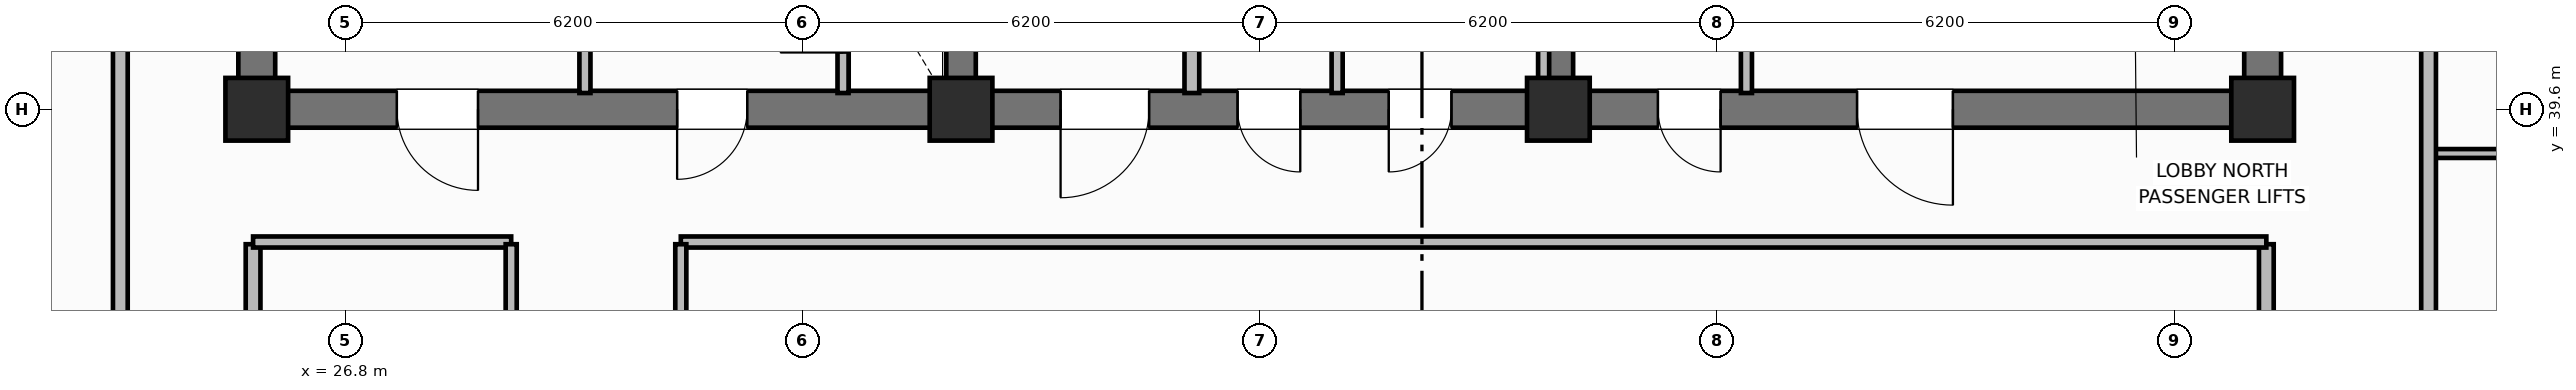
"""IFC4 building model, lengths in metres.
Left out: names, types, materials, properties, quantities, classifications, styles, units other than length and angle.
Written with IfcOpenShell. Run it as: python <this file> out.ifc"""

import sys

from ifc_helpers import new_model, si_unit, direction, frame, frame_2d, origin, origin_2d, place, context, subcontext, project, spatial, rectangle, extrude, element, fill, save


model = new_model("IFC4")
c1 = context("Model", 3, precision=1e-05, world=origin(), true_north=direction((0.0, 1.0)))
c2 = subcontext(c1, "Body", "Model", "MODEL_VIEW")
j1 = project(units=[si_unit("LENGTHUNIT", "METRE"), si_unit("PLANEANGLEUNIT", "RADIAN")], contexts=[c1])
p1 = place(None, origin())
s1 = spatial("IfcSite", under=j1, at=p1, CompositionType="ELEMENT")
p2 = place(p1, origin())
s2 = spatial("IfcBuilding", under=s1, at=p2, CompositionType="ELEMENT")
p3 = place(p2, frame((0.0, 0.0, 203.1)))
s3 = spatial("IfcBuildingStorey", under=s2, at=p3, CompositionType="ELEMENT", Elevation=203.1)
for number, where, z_axis, x_axis in (
    (1, (25.6, 39.85, 0.0), (0.0, 0.0, 1.0), (0.0, 1.0, 0.0)),
    (2, (52.8, 39.85, 0.0), (0.0, 0.0, 1.0), (0.0, 1.0, 0.0)),
):
    element("IfcWall", number, at=place(p3, frame(where, z_axis=z_axis, x_axis=x_axis)), inside=s3, PredefinedType="SHEAR", context=c2, shape_type="SweptSolid", body=[
        extrude(rectangle(XDim=5.7, YDim=0.5, at=frame_2d((2.85, 0.0))), origin(), (0.0, 0.0, 1.0), 4.2),
    ])
p4 = place(p3, frame((52.8, 39.6, 0.0), z_axis=(0.0, 0.0, 1.0), x_axis=(-1.0, 0.0, 0.0)))
e3 = element("IfcWall", 3, at=p4, inside=s3, PredefinedType="SHEAR", context=c2, shape_type="SweptSolid", body=[
    extrude(rectangle(XDim=27.2, YDim=0.5, at=frame_2d((13.6, 0.0))), origin(), (0.0, 0.0, 1.0), 4.2),
])
p5 = place(p4, frame((24.2, 0.0, 0.0)))
e4 = element("IfcOpeningElement", 4, at=p5, cuts=e3, PredefinedType="OPENING", context=c2, shape_type="SweptSolid", body=[
    extrude(rectangle(XDim=1.1, YDim=2.15, at=frame_2d((0.55, 1.075))), frame((0.0, 0.26, 0.0), z_axis=(0.0, -1.0, 0.0), x_axis=(1.0, 0.0, 0.0)), (0.0, 0.0, 1.0), 0.52),
])
p6 = place(p4, frame((20.55, 0.0, 0.0)))
e5 = element("IfcOpeningElement", 5, at=p6, cuts=e3, PredefinedType="OPENING", context=c2, shape_type="SweptSolid", body=[
    extrude(rectangle(XDim=0.95, YDim=2.1, at=frame_2d((0.475, 1.05))), frame((0.0, 0.26, 0.0), z_axis=(0.0, -1.0, 0.0), x_axis=(1.0, 0.0, 0.0)), (0.0, 0.0, 1.0), 0.52),
])
p7 = place(p4, frame((15.1, 0.0, 0.0)))
e6 = element("IfcOpeningElement", 6, at=p7, cuts=e3, PredefinedType="OPENING", context=c2, shape_type="SweptSolid", body=[
    extrude(rectangle(XDim=1.2, YDim=2.15, at=frame_2d((0.6, 1.075))), frame((0.0, 0.26, 0.0), z_axis=(0.0, -1.0, 0.0), x_axis=(1.0, 0.0, 0.0)), (0.0, 0.0, 1.0), 0.52),
])
p8 = place(p4, frame((13.05, 0.0, 0.0)))
e7 = element("IfcOpeningElement", 7, at=p8, cuts=e3, PredefinedType="OPENING", context=c2, shape_type="SweptSolid", body=[
    extrude(rectangle(XDim=0.85, YDim=2.1, at=frame_2d((0.425, 1.05))), frame((0.0, 0.26, 0.0), z_axis=(0.0, -1.0, 0.0), x_axis=(1.0, 0.0, 0.0)), (0.0, 0.0, 1.0), 0.52),
])
p9 = place(p4, frame((11.0, 0.0, 0.0)))
e8 = element("IfcOpeningElement", 8, at=p9, cuts=e3, PredefinedType="OPENING", context=c2, shape_type="SweptSolid", body=[
    extrude(rectangle(XDim=0.85, YDim=2.1, at=frame_2d((0.425, 1.05))), frame((0.0, 0.26, 0.0), z_axis=(0.0, -1.0, 0.0), x_axis=(1.0, 0.0, 0.0)), (0.0, 0.0, 1.0), 0.52),
])
p10 = place(p4, frame((7.35, 0.0, 0.0)))
e9 = element("IfcOpeningElement", 9, at=p10, cuts=e3, PredefinedType="OPENING", context=c2, shape_type="SweptSolid", body=[
    extrude(rectangle(XDim=0.85, YDim=2.1, at=frame_2d((0.425, 1.05))), frame((0.0, 0.26, 0.0), z_axis=(0.0, -1.0, 0.0), x_axis=(1.0, 0.0, 0.0)), (0.0, 0.0, 1.0), 0.52),
])
p11 = place(p4, frame((4.2, 0.0, 0.0)))
e10 = element("IfcOpeningElement", 10, at=p11, cuts=e3, PredefinedType="OPENING", context=c2, shape_type="SweptSolid", body=[
    extrude(rectangle(XDim=1.3, YDim=2.2, at=frame_2d((0.65, 1.1))), frame((0.0, 0.26, 0.0), z_axis=(0.0, -1.0, 0.0), x_axis=(1.0, 0.0, 0.0)), (0.0, 0.0, 1.0), 0.52),
])
for number, where, z_axis, x_axis in (
    (11, (35.15, 39.85, 0.0), (0.0, 0.0, 1.0), (0.0, 1.0, 0.0)),
    (12, (43.25, 39.85, 0.0), (0.0, 0.0, 1.0), (0.0, 1.0, 0.0)),
):
    element("IfcWall", number, at=place(p3, frame(where, z_axis=z_axis, x_axis=x_axis)), inside=s3, PredefinedType="SHEAR", context=c2, shape_type="SweptSolid", body=[
        extrude(rectangle(XDim=5.7, YDim=0.4, at=frame_2d((2.85, 0.0))), origin(), (0.0, 0.0, 1.0), 4.2),
    ])
for number, where, z_axis, x_axis in (
    (13, (25.6, 39.6, 0.0), (0.0, 0.0, 1.0), (1.0, 0.0, 0.0)),
    (14, (35.15, 39.6, 0.0), (0.0, 0.0, 1.0), (1.0, 0.0, 0.0)),
    (15, (43.25, 39.6, 0.0), (0.0, 0.0, 1.0), (1.0, 0.0, 0.0)),
    (16, (52.8, 39.6, 0.0), (0.0, 0.0, 1.0), (1.0, 0.0, 0.0)),
):
    element("IfcColumn", number, at=place(p3, frame(where, z_axis=z_axis, x_axis=x_axis)), inside=s3, PredefinedType="COLUMN", context=c2, shape_type="SweptSolid", body=[
        extrude(rectangle(XDim=0.85, YDim=0.85, at=origin_2d()), origin(), (0.0, 0.0, 1.0), 4.2),
    ])
p12 = place(p3, frame((33.55, 39.82, 0.0), z_axis=(0.0, 0.0, 1.0), x_axis=(0.0, 1.0, 0.0)))
e17 = element("IfcWall", 17, at=p12, inside=s3, PredefinedType="PARTITIONING", context=c2, shape_type="SweptSolid", body=[
    extrude(rectangle(XDim=2.13, YDim=0.15, at=frame_2d((1.065, 0.0))), origin(), (0.0, 0.0, 1.0), 3.05),
])
p13 = place(p12, frame((0.55, 0.0, 0.0)))
e18 = element("IfcOpeningElement", 18, at=p13, cuts=e17, PredefinedType="OPENING", context=c2, shape_type="SweptSolid", body=[
    extrude(rectangle(XDim=0.85, YDim=2.05, at=frame_2d((0.425, 1.025))), frame((0.0, 0.085, 0.0), z_axis=(0.0, -1.0, 0.0), x_axis=(1.0, 0.0, 0.0)), (0.0, 0.0, 1.0), 0.17),
])
p14 = place(p3, frame((30.05, 39.82, 0.0), z_axis=(0.0, 0.0, 1.0), x_axis=(0.0, 1.0, 0.0)))
e19 = element("IfcWall", 19, at=p14, inside=s3, PredefinedType="PARTITIONING", context=c2, shape_type="SweptSolid", body=[
    extrude(rectangle(XDim=2.13, YDim=0.15, at=frame_2d((1.065, 0.0))), origin(), (0.0, 0.0, 1.0), 3.05),
])
p15 = place(p3, frame((38.28, 39.82, 0.0), z_axis=(0.0, 0.0, 1.0), x_axis=(0.0, 1.0, 0.0)))
e20 = element("IfcWall", 20, at=p15, inside=s3, PredefinedType="PARTITIONING", context=c2, shape_type="SweptSolid", body=[
    extrude(rectangle(XDim=5.63, YDim=0.2, at=frame_2d((2.815, 0.0))), origin(), (0.0, 0.0, 1.0), 3.05),
])
for number, where, z_axis, x_axis in (
    (21, (43.05, 39.82, 0.0), (0.0, 0.0, 1.0), (0.0, 1.0, 0.0)),
    (22, (40.25, 39.82, 0.0), (0.0, 0.0, 1.0), (0.0, 1.0, 0.0)),
    (23, (45.8, 39.82, 0.0), (0.0, 0.0, 1.0), (0.0, 1.0, 0.0)),
):
    element("IfcWall", number, at=place(p3, frame(where, z_axis=z_axis, x_axis=x_axis)), inside=s3, PredefinedType="PARTITIONING", context=c2, shape_type="SweptSolid", body=[
        extrude(rectangle(XDim=5.63, YDim=0.15, at=frame_2d((2.815, 0.0))), origin(), (0.0, 0.0, 1.0), 3.05),
    ])
for number, where, z_axis, x_axis in (
    (24, (25.55, 18.63, 0.0), (0.0, 0.0, 1.0), (0.0, 1.0, 0.0)),
    (25, (52.85, 18.63, 0.0), (0.0, 0.0, 1.0), (0.0, 1.0, 0.0)),
):
    element("IfcWall", number, at=place(p3, frame(where, z_axis=z_axis, x_axis=x_axis)), inside=s3, PredefinedType="PARTITIONING", context=c2, shape_type="SweptSolid", body=[
        extrude(rectangle(XDim=19.14, YDim=0.2, at=frame_2d((9.57, 0.0))), origin(), (0.0, 0.0, 1.0), 3.05),
    ])
p16 = place(p3, frame((25.55, 37.8, 0.0), z_axis=(0.0, 0.0, 1.0), x_axis=(1.0, 0.0, 0.0)))
e26 = element("IfcWall", 26, at=p16, inside=s3, PredefinedType="PARTITIONING", context=c2, shape_type="SweptSolid", body=[
    extrude(rectangle(XDim=3.5, YDim=0.15, at=frame_2d((1.75, 0.0))), origin(), (0.0, 0.0, 1.0), 3.05),
])
p17 = place(p3, frame((31.35, 37.8, 0.0), z_axis=(0.0, 0.0, 1.0), x_axis=(1.0, 0.0, 0.0)))
e27 = element("IfcWall", 27, at=p17, inside=s3, PredefinedType="PARTITIONING", context=c2, shape_type="SweptSolid", body=[
    extrude(rectangle(XDim=21.5, YDim=0.15, at=frame_2d((10.75, 0.0))), origin(), (0.0, 0.0, 1.0), 3.05),
])
p18 = place(p3, frame((29.05, 18.63, 0.0), z_axis=(0.0, 0.0, 1.0), x_axis=(0.0, 1.0, 0.0)))
e28 = element("IfcWall", 28, at=p18, inside=s3, PredefinedType="PARTITIONING", context=c2, shape_type="SweptSolid", body=[
    extrude(rectangle(XDim=19.14, YDim=0.15, at=frame_2d((9.57, 0.0))), origin(), (0.0, 0.0, 1.0), 3.05),
])
p19 = place(p18, frame((5.5, 0.0, 0.0)))
e29 = element("IfcOpeningElement", 29, at=p19, cuts=e28, PredefinedType="OPENING", context=c2, shape_type="SweptSolid", body=[
    extrude(rectangle(XDim=1.0, YDim=2.15, at=frame_2d((0.5, 1.075))), frame((0.0, 0.085, 0.0), z_axis=(0.0, -1.0, 0.0), x_axis=(1.0, 0.0, 0.0)), (0.0, 0.0, 1.0), 0.17),
])
p20 = place(p3, frame((31.35, 18.63, 0.0), z_axis=(0.0, 0.0, 1.0), x_axis=(0.0, 1.0, 0.0)))
e30 = element("IfcWall", 30, at=p20, inside=s3, PredefinedType="PARTITIONING", context=c2, shape_type="SweptSolid", body=[
    extrude(rectangle(XDim=19.14, YDim=0.15, at=frame_2d((9.57, 0.0))), origin(), (0.0, 0.0, 1.0), 3.05),
])
p21 = place(p20, frame((2.4, 0.0, 0.0)))
e31 = element("IfcOpeningElement", 31, at=p21, cuts=e30, PredefinedType="OPENING", context=c2, shape_type="SweptSolid", body=[
    extrude(rectangle(XDim=1.3, YDim=2.2, at=frame_2d((0.65, 1.1))), frame((0.0, 0.085, 0.0), z_axis=(0.0, -1.0, 0.0), x_axis=(1.0, 0.0, 0.0)), (0.0, 0.0, 1.0), 0.17),
])
p22 = place(p20, frame((12.719, 0.0, 0.0)))
e32 = element("IfcOpeningElement", 32, at=p22, cuts=e30, PredefinedType="OPENING", context=c2, shape_type="SweptSolid", body=[
    extrude(rectangle(XDim=1.0, YDim=2.15, at=frame_2d((0.5, 1.075))), frame((0.0, 0.085, 0.0), z_axis=(0.0, -1.0, 0.0), x_axis=(1.0, 0.0, 0.0)), (0.0, 0.0, 1.0), 0.17),
])
p23 = place(p3, frame((23.75, 10.6, 0.0), z_axis=(0.0, 0.0, 1.0), x_axis=(0.0, 1.0, 0.0)))
e33 = element("IfcWall", 33, at=p23, inside=s3, PredefinedType="PARTITIONING", context=c2, shape_type="SweptSolid", body=[
    extrude(rectangle(XDim=35.2, YDim=0.2, at=frame_2d((17.6, 0.0))), origin(), (0.0, 0.0, 1.0), 3.05),
])
p24 = place(p23, frame((2.65, 0.0, 0.0)))
e34 = element("IfcOpeningElement", 34, at=p24, cuts=e33, PredefinedType="OPENING", context=c2, shape_type="SweptSolid", body=[
    extrude(rectangle(XDim=1.0, YDim=2.15, at=frame_2d((0.5, 1.075))), frame((0.0, 0.11, 0.0), z_axis=(0.0, -1.0, 0.0), x_axis=(1.0, 0.0, 0.0)), (0.0, 0.0, 1.0), 0.22),
])
p25 = place(p23, frame((19.95, 0.0, 0.0)))
e35 = element("IfcOpeningElement", 35, at=p25, cuts=e33, PredefinedType="OPENING", context=c2, shape_type="SweptSolid", body=[
    extrude(rectangle(XDim=1.0, YDim=2.15, at=frame_2d((0.5, 1.075))), frame((0.0, 0.11, 0.0), z_axis=(0.0, -1.0, 0.0), x_axis=(1.0, 0.0, 0.0)), (0.0, 0.0, 1.0), 0.22),
])
p26 = place(p3, frame((55.05, 39.0, 0.0), z_axis=(0.0, 0.0, 1.0), x_axis=(1.0, 0.0, 0.0)))
e36 = element("IfcWall", 36, at=p26, inside=s3, PredefinedType="PARTITIONING", context=c2, shape_type="SweptSolid", body=[
    extrude(rectangle(XDim=2.25, YDim=0.12, at=frame_2d((1.125, 0.0))), origin(), (0.0, 0.0, 1.0), 3.05),
])
p27 = place(p3, frame((55.05, 10.6, 0.0), z_axis=(0.0, 0.0, 1.0), x_axis=(0.0, 1.0, 0.0)))
e37 = element("IfcWall", 37, at=p27, inside=s3, PredefinedType="PARTITIONING", context=c2, shape_type="SweptSolid", body=[
    extrude(rectangle(XDim=35.2, YDim=0.2, at=frame_2d((17.6, 0.0))), origin(), (0.0, 0.0, 1.0), 3.05),
])
p28 = place(p27, frame((2.65, 0.0, 0.0)))
e38 = element("IfcOpeningElement", 38, at=p28, cuts=e37, PredefinedType="OPENING", context=c2, shape_type="SweptSolid", body=[
    extrude(rectangle(XDim=1.0, YDim=2.15, at=frame_2d((0.5, 1.075))), frame((0.0, 0.11, 0.0), z_axis=(0.0, -1.0, 0.0), x_axis=(1.0, 0.0, 0.0)), (0.0, 0.0, 1.0), 0.22),
])
p29 = place(p27, frame((22.75, 0.0, 0.0)))
e39 = element("IfcOpeningElement", 39, at=p29, cuts=e37, PredefinedType="OPENING", context=c2, shape_type="SweptSolid", body=[
    extrude(rectangle(XDim=1.0, YDim=2.15, at=frame_2d((0.5, 1.075))), frame((0.0, 0.11, 0.0), z_axis=(0.0, -1.0, 0.0), x_axis=(1.0, 0.0, 0.0)), (0.0, 0.0, 1.0), 0.22),
])
p30 = place(p13, origin())
e40 = element("IfcDoor", 40, at=p30, inside=s3, OperationType="SINGLE_SWING_LEFT", PredefinedType="TRAPDOOR", context=c2, shape_type="SweptSolid", body=[
    extrude(rectangle(XDim=0.85, YDim=2.05, at=frame_2d((0.425, 1.025))), frame((0.0, 0.025, 0.0), z_axis=(0.0, -1.0, 0.0), x_axis=(1.0, 0.0, 0.0)), (0.0, 0.0, 1.0), 0.05),
])
fill(e18, e40)
p31 = place(p5, origin())
e41 = element("IfcDoor", 41, at=p31, inside=s3, OperationType="SINGLE_SWING_LEFT", PredefinedType="DOOR", context=c2, shape_type="SweptSolid", body=[
    extrude(rectangle(XDim=1.1, YDim=2.15, at=frame_2d((0.55, 1.075))), frame((0.0, 0.025, 0.0), z_axis=(0.0, -1.0, 0.0), x_axis=(1.0, 0.0, 0.0)), (0.0, 0.0, 1.0), 0.05),
])
fill(e4, e41)
p32 = place(p6, origin())
e42 = element("IfcDoor", 42, at=p32, inside=s3, OperationType="SINGLE_SWING_RIGHT", PredefinedType="DOOR", context=c2, shape_type="SweptSolid", body=[
    extrude(rectangle(XDim=0.95, YDim=2.1, at=frame_2d((0.475, 1.05))), frame((0.0, 0.025, 0.0), z_axis=(0.0, -1.0, 0.0), x_axis=(1.0, 0.0, 0.0)), (0.0, 0.0, 1.0), 0.05),
])
fill(e5, e42)
p33 = place(p7, origin())
e43 = element("IfcDoor", 43, at=p33, inside=s3, OperationType="SINGLE_SWING_RIGHT", PredefinedType="DOOR", context=c2, shape_type="SweptSolid", body=[
    extrude(rectangle(XDim=1.2, YDim=2.15, at=frame_2d((0.6, 1.075))), frame((0.0, 0.025, 0.0), z_axis=(0.0, -1.0, 0.0), x_axis=(1.0, 0.0, 0.0)), (0.0, 0.0, 1.0), 0.05),
])
fill(e6, e43)
p34 = place(p8, origin())
e44 = element("IfcDoor", 44, at=p34, inside=s3, OperationType="SINGLE_SWING_LEFT", PredefinedType="DOOR", context=c2, shape_type="SweptSolid", body=[
    extrude(rectangle(XDim=0.85, YDim=2.1, at=frame_2d((0.425, 1.05))), frame((0.0, 0.025, 0.0), z_axis=(0.0, -1.0, 0.0), x_axis=(1.0, 0.0, 0.0)), (0.0, 0.0, 1.0), 0.05),
])
fill(e7, e44)
p35 = place(p9, origin())
e45 = element("IfcDoor", 45, at=p35, inside=s3, OperationType="SINGLE_SWING_RIGHT", PredefinedType="DOOR", context=c2, shape_type="SweptSolid", body=[
    extrude(rectangle(XDim=0.85, YDim=2.1, at=frame_2d((0.425, 1.05))), frame((0.0, 0.025, 0.0), z_axis=(0.0, -1.0, 0.0), x_axis=(1.0, 0.0, 0.0)), (0.0, 0.0, 1.0), 0.05),
])
fill(e8, e45)
p36 = place(p10, origin())
e46 = element("IfcDoor", 46, at=p36, inside=s3, OperationType="SINGLE_SWING_LEFT", PredefinedType="DOOR", context=c2, shape_type="SweptSolid", body=[
    extrude(rectangle(XDim=0.85, YDim=2.1, at=frame_2d((0.425, 1.05))), frame((0.0, 0.025, 0.0), z_axis=(0.0, -1.0, 0.0), x_axis=(1.0, 0.0, 0.0)), (0.0, 0.0, 1.0), 0.05),
])
fill(e9, e46)
p37 = place(p11, origin())
e47 = element("IfcDoor", 47, at=p37, inside=s3, OperationType="SINGLE_SWING_LEFT", PredefinedType="DOOR", context=c2, shape_type="SweptSolid", body=[
    extrude(rectangle(XDim=1.3, YDim=2.2, at=frame_2d((0.65, 1.1))), frame((0.0, 0.025, 0.0), z_axis=(0.0, -1.0, 0.0), x_axis=(1.0, 0.0, 0.0)), (0.0, 0.0, 1.0), 0.05),
])
fill(e10, e47)
save(model, sys.argv[1])
